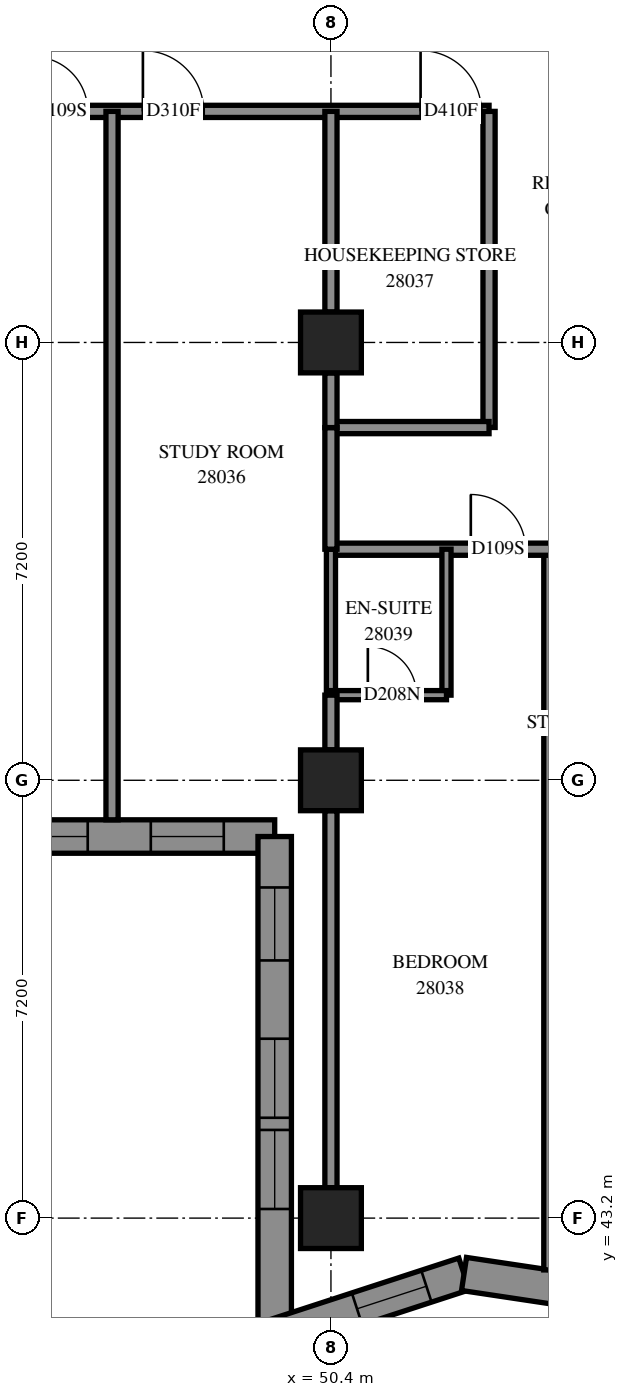
"""IFC4 building model, lengths in metres.
Left out: names, types, materials, properties, quantities, classifications, styles, units other than length and angle.
Written with IfcOpenShell. Run it as: python <this file> out.ifc"""

import sys

from ifc_helpers import new_model, si_unit, direction, frame, frame_2d, origin, origin_2d, place, context, subcontext, project, spatial, polyline, rectangle, outline, extrude, element, fill, save


model = new_model("IFC4")
c1 = context("Model", 3, precision=1e-05, world=origin(), true_north=direction((0.0, 1.0)))
c2 = subcontext(c1, "Body", "Model", "MODEL_VIEW")
j1 = project(units=[si_unit("LENGTHUNIT", "METRE"), si_unit("PLANEANGLEUNIT", "RADIAN")], contexts=[c1])
p1 = place(None, origin())
s1 = spatial("IfcSite", under=j1, at=p1, CompositionType="ELEMENT")
p2 = place(p1, origin())
s2 = spatial("IfcBuilding", under=s1, at=p2, CompositionType="ELEMENT")
p3 = place(p2, frame((0.0, 0.0, 105.0)))
s3 = spatial("IfcBuildingStorey", under=s2, at=p3, CompositionType="ELEMENT", Elevation=105.0)
for number, where, z_axis, x_axis in (
    (1, (50.4, 43.2, 0.0), (0.0, 0.0, 1.0), (1.0, 0.0, 0.0)),
    (2, (50.4, 50.4, 0.0), (0.0, 0.0, 1.0), (1.0, 0.0, 0.0)),
    (3, (50.4, 57.6, 0.0), (0.0, 0.0, 1.0), (1.0, 0.0, 0.0)),
):
    element("IfcColumn", number, at=place(p3, frame(where, z_axis=z_axis, x_axis=x_axis)), inside=s3, PredefinedType="COLUMN", context=c2, shape_type="SweptSolid", body=[
        extrude(rectangle(XDim=1.0, YDim=1.0, at=origin_2d()), origin(), (0.0, 0.0, 1.0), 3.1),
    ])
p4 = place(p3, frame((42.275, 49.475, 0.0), z_axis=(0.0, 0.0, 1.0), x_axis=(1.0, 0.0, 0.0)))
e4 = element("IfcWall", 4, at=p4, inside=s3, PredefinedType="SOLIDWALL", context=c2, shape_type="SweptSolid", body=[
    extrude(outline(polyline([(-0.275, -0.275), (6.925, -0.275), (7.475, 0.275), (0.275, 0.275), (-0.275, -0.275)])), origin(), (0.0, 0.0, 1.0), 3.1),
])
p5 = place(p4, frame((1.325, 0.0, 0.5)))
e5 = element("IfcOpeningElement", 5, at=p5, cuts=e4, PredefinedType="OPENING", context=c2, shape_type="SweptSolid", body=[
    extrude(rectangle(XDim=1.3, YDim=2.45, at=frame_2d((0.65, 1.225))), frame((0.0, 0.285, 0.0), z_axis=(0.0, -1.0, 0.0), x_axis=(1.0, 0.0, 0.0)), (0.0, 0.0, 1.0), 0.57),
])
p6 = place(p4, frame((2.825, 0.0, 0.5)))
e6 = element("IfcOpeningElement", 6, at=p6, cuts=e4, PredefinedType="OPENING", context=c2, shape_type="SweptSolid", body=[
    extrude(rectangle(XDim=1.3, YDim=2.45, at=frame_2d((0.65, 1.225))), frame((0.0, 0.285, 0.0), z_axis=(0.0, -1.0, 0.0), x_axis=(1.0, 0.0, 0.0)), (0.0, 0.0, 1.0), 0.57),
])
p7 = place(p4, frame((5.162, 0.0, 0.5)))
e7 = element("IfcOpeningElement", 7, at=p7, cuts=e4, PredefinedType="OPENING", context=c2, shape_type="SweptSolid", body=[
    extrude(rectangle(XDim=1.2, YDim=2.45, at=frame_2d((0.6, 1.225))), frame((0.0, 0.285, 0.0), z_axis=(0.0, -1.0, 0.0), x_axis=(1.0, 0.0, 0.0)), (0.0, 0.0, 1.0), 0.57),
])
p8 = place(p3, frame((49.475, 49.475, 0.0), z_axis=(0.0, 0.0, 1.0), x_axis=(0.0, -1.0, 0.0)))
e8 = element("IfcWall", 8, at=p8, inside=s3, PredefinedType="SOLIDWALL", context=c2, shape_type="SweptSolid", body=[
    extrude(outline(polyline([(0.275, -0.275), (8.587, -0.275), (7.829, 0.275), (-0.275, 0.275), (0.275, -0.275)])), origin(), (0.0, 0.0, 1.0), 3.1),
])
p9 = place(p8, frame((3.325, 0.0, 0.5)))
e9 = element("IfcOpeningElement", 9, at=p9, cuts=e8, PredefinedType="OPENING", context=c2, shape_type="SweptSolid", body=[
    extrude(rectangle(XDim=1.3, YDim=2.45, at=frame_2d((0.65, 1.225))), frame((0.0, 0.285, 0.0), z_axis=(0.0, -1.0, 0.0), x_axis=(1.0, 0.0, 0.0)), (0.0, 0.0, 1.0), 0.57),
])
p10 = place(p8, frame((4.825, 0.0, 0.5)))
e10 = element("IfcOpeningElement", 10, at=p10, cuts=e8, PredefinedType="OPENING", context=c2, shape_type="SweptSolid", body=[
    extrude(rectangle(XDim=1.3, YDim=2.45, at=frame_2d((0.65, 1.225))), frame((0.0, 0.285, 0.0), z_axis=(0.0, -1.0, 0.0), x_axis=(1.0, 0.0, 0.0)), (0.0, 0.0, 1.0), 0.57),
])
p11 = place(p8, frame((0.838, 0.0, 0.5)))
e11 = element("IfcOpeningElement", 11, at=p11, cuts=e8, PredefinedType="OPENING", context=c2, shape_type="SweptSolid", body=[
    extrude(rectangle(XDim=1.2, YDim=2.45, at=frame_2d((0.6, 1.225))), frame((0.0, 0.285, 0.0), z_axis=(0.0, -1.0, 0.0), x_axis=(1.0, 0.0, 0.0)), (0.0, 0.0, 1.0), 0.57),
])
p12 = place(p3, frame((49.475, 41.267, 0.0), z_axis=(0.0, 0.0, 1.0), x_axis=(0.9507812873, 0.3098627821, 0.0)))
e12 = element("IfcWall", 12, at=p12, inside=s3, PredefinedType="SOLIDWALL", context=c2, shape_type="SweptSolid", body=[
    extrude(outline(polyline([(-0.379, -0.275), (3.21, -0.275), (3.34, 0.275), (0.379, 0.275), (-0.379, -0.275)])), origin(), (0.0, 0.0, 1.0), 3.1),
])
p13 = place(p12, frame((1.424, 0.0, 0.5)))
e13 = element("IfcOpeningElement", 13, at=p13, cuts=e12, PredefinedType="OPENING", context=c2, shape_type="SweptSolid", body=[
    extrude(rectangle(XDim=1.2, YDim=2.45, at=frame_2d((0.6, 1.225))), frame((0.0, 0.285, 0.0), z_axis=(0.0, -1.0, 0.0), x_axis=(1.0, 0.0, 0.0)), (0.0, 0.0, 1.0), 0.57),
])
p14 = place(p3, frame((52.589, 42.282, 0.0), z_axis=(0.0, 0.0, 1.0), x_axis=(0.9889276939, -0.1483981679, 0.0)))
e14 = element("IfcWall", 14, at=p14, inside=s3, PredefinedType="SOLIDWALL", context=c2, shape_type="SweptSolid", body=[
    extrude(outline(polyline([(0.065, -0.275), (3.515, -0.275), (3.433, 0.275), (-0.065, 0.275), (0.065, -0.275)])), origin(), (0.0, 0.0, 1.0), 3.1),
])
p15 = place(p14, frame((1.73, 0.0, 0.5)))
e15 = element("IfcOpeningElement", 15, at=p15, cuts=e14, PredefinedType="OPENING", context=c2, shape_type="SweptSolid", body=[
    extrude(rectangle(XDim=1.2, YDim=2.45, at=frame_2d((0.6, 1.225))), frame((0.0, 0.285, 0.0), z_axis=(0.0, -1.0, 0.0), x_axis=(1.0, 0.0, 0.0)), (0.0, 0.0, 1.0), 0.57),
])
p16 = place(p3, frame((28.8, 61.4, 0.0), z_axis=(0.0, 0.0, 1.0), x_axis=(1.0, 0.0, 0.0)))
e16 = element("IfcWall", 16, at=p16, inside=s3, PredefinedType="PARTITIONING", context=c2, shape_type="SweptSolid", body=[
    extrude(rectangle(XDim=24.2, YDim=0.2, at=frame_2d((12.1, 0.0))), origin(), (0.0, 0.0, 1.0), 3.1),
])
p17 = place(p16, frame((2.3, 0.0, 0.0)))
e17 = element("IfcOpeningElement", 17, at=p17, cuts=e16, PredefinedType="OPENING", context=c2, shape_type="SweptSolid", body=[
    extrude(rectangle(XDim=0.9, YDim=2.1, at=frame_2d((0.45, 1.05))), frame((0.0, 0.11, 0.0), z_axis=(0.0, -1.0, 0.0), x_axis=(1.0, 0.0, 0.0)), (0.0, 0.0, 1.0), 0.22),
])
p18 = place(p16, frame((5.901, 0.0, 0.0)))
e18 = element("IfcOpeningElement", 18, at=p18, cuts=e16, PredefinedType="OPENING", context=c2, shape_type="SweptSolid", body=[
    extrude(rectangle(XDim=0.9, YDim=2.1, at=frame_2d((0.45, 1.05))), frame((0.0, 0.11, 0.0), z_axis=(0.0, -1.0, 0.0), x_axis=(1.0, 0.0, 0.0)), (0.0, 0.0, 1.0), 0.22),
])
p19 = place(p16, frame((11.307, 0.0, 0.0)))
e19 = element("IfcOpeningElement", 19, at=p19, cuts=e16, PredefinedType="OPENING", context=c2, shape_type="SweptSolid", body=[
    extrude(rectangle(XDim=1.0, YDim=2.1, at=frame_2d((0.5, 1.05))), frame((0.0, 0.11, 0.0), z_axis=(0.0, -1.0, 0.0), x_axis=(1.0, 0.0, 0.0)), (0.0, 0.0, 1.0), 0.22),
])
p20 = place(p16, frame((16.7, 0.0, 0.0)))
e20 = element("IfcOpeningElement", 20, at=p20, cuts=e16, PredefinedType="OPENING", context=c2, shape_type="SweptSolid", body=[
    extrude(rectangle(XDim=0.9, YDim=2.1, at=frame_2d((0.45, 1.05))), frame((0.0, 0.11, 0.0), z_axis=(0.0, -1.0, 0.0), x_axis=(1.0, 0.0, 0.0)), (0.0, 0.0, 1.0), 0.22),
])
p21 = place(p16, frame((18.508, 0.0, 0.0)))
e21 = element("IfcOpeningElement", 21, at=p21, cuts=e16, PredefinedType="OPENING", context=c2, shape_type="SweptSolid", body=[
    extrude(rectangle(XDim=1.0, YDim=2.1, at=frame_2d((0.5, 1.05))), frame((0.0, 0.11, 0.0), z_axis=(0.0, -1.0, 0.0), x_axis=(1.0, 0.0, 0.0)), (0.0, 0.0, 1.0), 0.22),
])
p22 = place(p16, frame((23.074, 0.0, 0.0)))
e22 = element("IfcOpeningElement", 22, at=p22, cuts=e16, PredefinedType="OPENING", context=c2, shape_type="SweptSolid", body=[
    extrude(rectangle(XDim=1.0, YDim=2.1, at=frame_2d((0.5, 1.05))), frame((0.0, 0.11, 0.0), z_axis=(0.0, -1.0, 0.0), x_axis=(1.0, 0.0, 0.0)), (0.0, 0.0, 1.0), 0.22),
])
p23 = place(p3, frame((54.0, 42.348, 0.0), z_axis=(0.0, 0.0, 1.0), x_axis=(0.0, 1.0, 0.0)))
e23 = element("IfcWall", 23, at=p23, inside=s3, PredefinedType="PARTITIONING", context=c2, shape_type="SweptSolid", body=[
    extrude(rectangle(XDim=11.852, YDim=0.2, at=frame_2d((5.926, 0.0))), origin(), (0.0, 0.0, 1.0), 3.1),
])
p24 = place(p3, frame((46.8, 49.75, 0.0), z_axis=(0.0, 0.0, 1.0), x_axis=(0.0, 1.0, 0.0)))
e24 = element("IfcWall", 24, at=p24, inside=s3, PredefinedType="PARTITIONING", context=c2, shape_type="SweptSolid", body=[
    extrude(rectangle(XDim=11.65, YDim=0.2, at=frame_2d((5.825, 0.0))), origin(), (0.0, 0.0, 1.0), 3.1),
])
p25 = place(p3, frame((50.4, 43.7, 0.0), z_axis=(0.0, 0.0, 1.0), x_axis=(0.0, 1.0, 0.0)))
e25 = element("IfcWall", 25, at=p25, inside=s3, PredefinedType="PARTITIONING", context=c2, shape_type="SweptSolid", body=[
    extrude(rectangle(XDim=6.2, YDim=0.2, at=frame_2d((3.1, 0.0))), origin(), (0.0, 0.0, 1.0), 2.6),
])
p26 = place(p3, frame((53.0, 56.202, 0.0), z_axis=(0.0, 0.0, 1.0), x_axis=(0.0, 1.0, 0.0)))
e26 = element("IfcWall", 26, at=p26, inside=s3, PredefinedType="PARTITIONING", context=c2, shape_type="SweptSolid", body=[
    extrude(rectangle(XDim=5.198, YDim=0.2, at=frame_2d((2.599, 0.0))), origin(), (0.0, 0.0, 1.0), 3.1),
])
p27 = place(p3, frame((50.4, 54.2, 0.0), z_axis=(0.0, 0.0, 1.0), x_axis=(1.0, 0.0, 0.0)))
e27 = element("IfcWall", 27, at=p27, inside=s3, PredefinedType="PARTITIONING", context=c2, shape_type="SweptSolid", body=[
    extrude(rectangle(XDim=4.9, YDim=0.2, at=frame_2d((2.45, 0.0))), origin(), (0.0, 0.0, 1.0), 3.1),
])
p28 = place(p27, frame((2.3, 0.0, 0.0)))
e28 = element("IfcOpeningElement", 28, at=p28, cuts=e27, PredefinedType="OPENING", context=c2, shape_type="SweptSolid", body=[
    extrude(rectangle(XDim=0.9, YDim=2.1, at=frame_2d((0.45, 1.05))), frame((0.0, 0.11, 0.0), z_axis=(0.0, -1.0, 0.0), x_axis=(1.0, 0.0, 0.0)), (0.0, 0.0, 1.0), 0.22),
])
p29 = place(p3, frame((50.4, 58.1, 0.0), z_axis=(0.0, 0.0, 1.0), x_axis=(0.0, 1.0, 0.0)))
e29 = element("IfcWall", 29, at=p29, inside=s3, PredefinedType="PARTITIONING", context=c2, shape_type="SweptSolid", body=[
    extrude(rectangle(XDim=3.3, YDim=0.2, at=frame_2d((1.65, 0.0))), origin(), (0.0, 0.0, 1.0), 3.1),
])
p30 = place(p3, frame((50.4, 56.2, 0.0), z_axis=(0.0, 0.0, 1.0), x_axis=(1.0, 0.0, 0.0)))
e30 = element("IfcWall", 30, at=p30, inside=s3, PredefinedType="PARTITIONING", context=c2, shape_type="SweptSolid", body=[
    extrude(rectangle(XDim=2.6, YDim=0.2, at=frame_2d((1.3, 0.0))), origin(), (0.0, 0.0, 1.0), 3.1),
])
for number, where, z_axis, x_axis in (
    (31, (52.3, 51.8, 0.0), (0.0, 0.0, 1.0), (0.0, 1.0, 0.0)),
    (32, (50.4, 51.8, 0.0), (0.0, 0.0, 1.0), (0.0, 1.0, 0.0)),
):
    element("IfcWall", number, at=place(p3, frame(where, z_axis=z_axis, x_axis=x_axis)), inside=s3, PredefinedType="PARTITIONING", context=c2, shape_type="SweptSolid", body=[
        extrude(rectangle(XDim=2.4, YDim=0.15, at=frame_2d((1.2, 0.0))), origin(), (0.0, 0.0, 1.0), 3.1),
    ])
p31 = place(p3, frame((50.4, 54.2, 0.0), z_axis=(0.0, 0.0, 1.0), x_axis=(0.0, 1.0, 0.0)))
e33 = element("IfcWall", 33, at=p31, inside=s3, PredefinedType="PARTITIONING", context=c2, shape_type="SweptSolid", body=[
    extrude(rectangle(XDim=2.0, YDim=0.2, at=frame_2d((1.0, 0.0))), origin(), (0.0, 0.0, 1.0), 3.1),
])
p32 = place(p3, frame((50.4, 51.8, 0.0), z_axis=(0.0, 0.0, 1.0), x_axis=(1.0, 0.0, 0.0)))
e34 = element("IfcWall", 34, at=p32, inside=s3, PredefinedType="PARTITIONING", context=c2, shape_type="SweptSolid", body=[
    extrude(rectangle(XDim=1.9, YDim=0.15, at=frame_2d((0.95, 0.0))), origin(), (0.0, 0.0, 1.0), 3.1),
])
p33 = place(p32, frame((0.607, 0.0, 0.0)))
e35 = element("IfcOpeningElement", 35, at=p33, cuts=e34, PredefinedType="OPENING", context=c2, shape_type="SweptSolid", body=[
    extrude(rectangle(XDim=0.8, YDim=2.1, at=frame_2d((0.4, 1.05))), frame((0.0, 0.085, 0.0), z_axis=(0.0, -1.0, 0.0), x_axis=(1.0, 0.0, 0.0)), (0.0, 0.0, 1.0), 0.17),
])
for number, where, z_axis, x_axis in (
    (36, (50.4, 50.9, 0.0), (0.0, 0.0, 1.0), (0.0, 1.0, 0.0)),
    (37, (50.4, 56.2, 0.0), (0.0, 0.0, 1.0), (0.0, 1.0, 0.0)),
):
    element("IfcWall", number, at=place(p3, frame(where, z_axis=z_axis, x_axis=x_axis)), inside=s3, PredefinedType="PARTITIONING", context=c2, shape_type="SweptSolid", body=[
        extrude(rectangle(XDim=0.9, YDim=0.2, at=frame_2d((0.45, 0.0))), origin(), (0.0, 0.0, 1.0), 3.1),
    ])
p34 = place(p6, origin())
e38 = element("IfcWindow", 38, at=p34, inside=s3, PartitioningType="SINGLE_PANEL", PredefinedType="WINDOW", context=c2, shape_type="SweptSolid", body=[
    extrude(rectangle(XDim=1.3, YDim=2.45, at=frame_2d((0.65, 1.225))), frame((0.0, 0.155, 0.0), z_axis=(0.0, -1.0, 0.0), x_axis=(1.0, 0.0, 0.0)), (0.0, 0.0, 1.0), 0.06),
])
fill(e6, e38)
p35 = place(p7, origin())
e39 = element("IfcWindow", 39, at=p35, inside=s3, PartitioningType="SINGLE_PANEL", PredefinedType="WINDOW", context=c2, shape_type="SweptSolid", body=[
    extrude(rectangle(XDim=1.2, YDim=2.45, at=frame_2d((0.6, 1.225))), frame((0.0, 0.155, 0.0), z_axis=(0.0, -1.0, 0.0), x_axis=(1.0, 0.0, 0.0)), (0.0, 0.0, 1.0), 0.06),
])
fill(e7, e39)
p36 = place(p9, origin())
e40 = element("IfcWindow", 40, at=p36, inside=s3, PartitioningType="SINGLE_PANEL", PredefinedType="WINDOW", context=c2, shape_type="SweptSolid", body=[
    extrude(rectangle(XDim=1.3, YDim=2.45, at=frame_2d((0.65, 1.225))), frame((0.0, 0.155, 0.0), z_axis=(0.0, -1.0, 0.0), x_axis=(1.0, 0.0, 0.0)), (0.0, 0.0, 1.0), 0.06),
])
fill(e9, e40)
p37 = place(p10, origin())
e41 = element("IfcWindow", 41, at=p37, inside=s3, PartitioningType="SINGLE_PANEL", PredefinedType="WINDOW", context=c2, shape_type="SweptSolid", body=[
    extrude(rectangle(XDim=1.3, YDim=2.45, at=frame_2d((0.65, 1.225))), frame((0.0, 0.155, 0.0), z_axis=(0.0, -1.0, 0.0), x_axis=(1.0, 0.0, 0.0)), (0.0, 0.0, 1.0), 0.06),
])
fill(e10, e41)
p38 = place(p11, origin())
e42 = element("IfcWindow", 42, at=p38, inside=s3, PartitioningType="SINGLE_PANEL", PredefinedType="WINDOW", context=c2, shape_type="SweptSolid", body=[
    extrude(rectangle(XDim=1.2, YDim=2.45, at=frame_2d((0.6, 1.225))), frame((0.0, 0.155, 0.0), z_axis=(0.0, -1.0, 0.0), x_axis=(1.0, 0.0, 0.0)), (0.0, 0.0, 1.0), 0.06),
])
fill(e11, e42)
p39 = place(p13, origin())
e43 = element("IfcWindow", 43, at=p39, inside=s3, PartitioningType="SINGLE_PANEL", PredefinedType="WINDOW", context=c2, shape_type="SweptSolid", body=[
    extrude(rectangle(XDim=1.2, YDim=2.45, at=frame_2d((0.6, 1.225))), frame((0.0, 0.155, 0.0), z_axis=(0.0, -1.0, 0.0), x_axis=(1.0, 0.0, 0.0)), (0.0, 0.0, 1.0), 0.06),
])
fill(e13, e43)
p40 = place(p20, origin())
e44 = element("IfcDoor", 44, at=p40, inside=s3, OperationType="SINGLE_SWING_LEFT", PredefinedType="DOOR", context=c2, shape_type="SweptSolid", body=[
    extrude(rectangle(XDim=0.9, YDim=2.1, at=frame_2d((0.45, 1.05))), frame((0.0, 0.025, 0.0), z_axis=(0.0, -1.0, 0.0), x_axis=(1.0, 0.0, 0.0)), (0.0, 0.0, 1.0), 0.05),
])
fill(e20, e44)
p41 = place(p21, origin())
e45 = element("IfcDoor", 45, at=p41, inside=s3, OperationType="SINGLE_SWING_RIGHT", PredefinedType="DOOR", context=c2, shape_type="SweptSolid", body=[
    extrude(rectangle(XDim=1.0, YDim=2.1, at=frame_2d((0.5, 1.05))), frame((0.0, 0.025, 0.0), z_axis=(0.0, -1.0, 0.0), x_axis=(1.0, 0.0, 0.0)), (0.0, 0.0, 1.0), 0.05),
])
fill(e21, e45)
p42 = place(p22, origin())
e46 = element("IfcDoor", 46, at=p42, inside=s3, OperationType="SINGLE_SWING_LEFT", PredefinedType="DOOR", context=c2, shape_type="SweptSolid", body=[
    extrude(rectangle(XDim=1.0, YDim=2.1, at=frame_2d((0.5, 1.05))), frame((0.0, 0.025, 0.0), z_axis=(0.0, -1.0, 0.0), x_axis=(1.0, 0.0, 0.0)), (0.0, 0.0, 1.0), 0.05),
])
fill(e22, e46)
p43 = place(p28, origin())
e47 = element("IfcDoor", 47, at=p43, inside=s3, OperationType="SINGLE_SWING_LEFT", PredefinedType="DOOR", context=c2, shape_type="SweptSolid", body=[
    extrude(rectangle(XDim=0.9, YDim=2.1, at=frame_2d((0.45, 1.05))), frame((0.0, 0.025, 0.0), z_axis=(0.0, -1.0, 0.0), x_axis=(1.0, 0.0, 0.0)), (0.0, 0.0, 1.0), 0.05),
])
fill(e28, e47)
p44 = place(p33, origin())
e48 = element("IfcDoor", 48, at=p44, inside=s3, OperationType="SINGLE_SWING_RIGHT", PredefinedType="DOOR", context=c2, shape_type="SweptSolid", body=[
    extrude(rectangle(XDim=0.8, YDim=2.1, at=frame_2d((0.4, 1.05))), frame((0.0, 0.025, 0.0), z_axis=(0.0, -1.0, 0.0), x_axis=(1.0, 0.0, 0.0)), (0.0, 0.0, 1.0), 0.05),
])
fill(e35, e48)
save(model, sys.argv[1])
